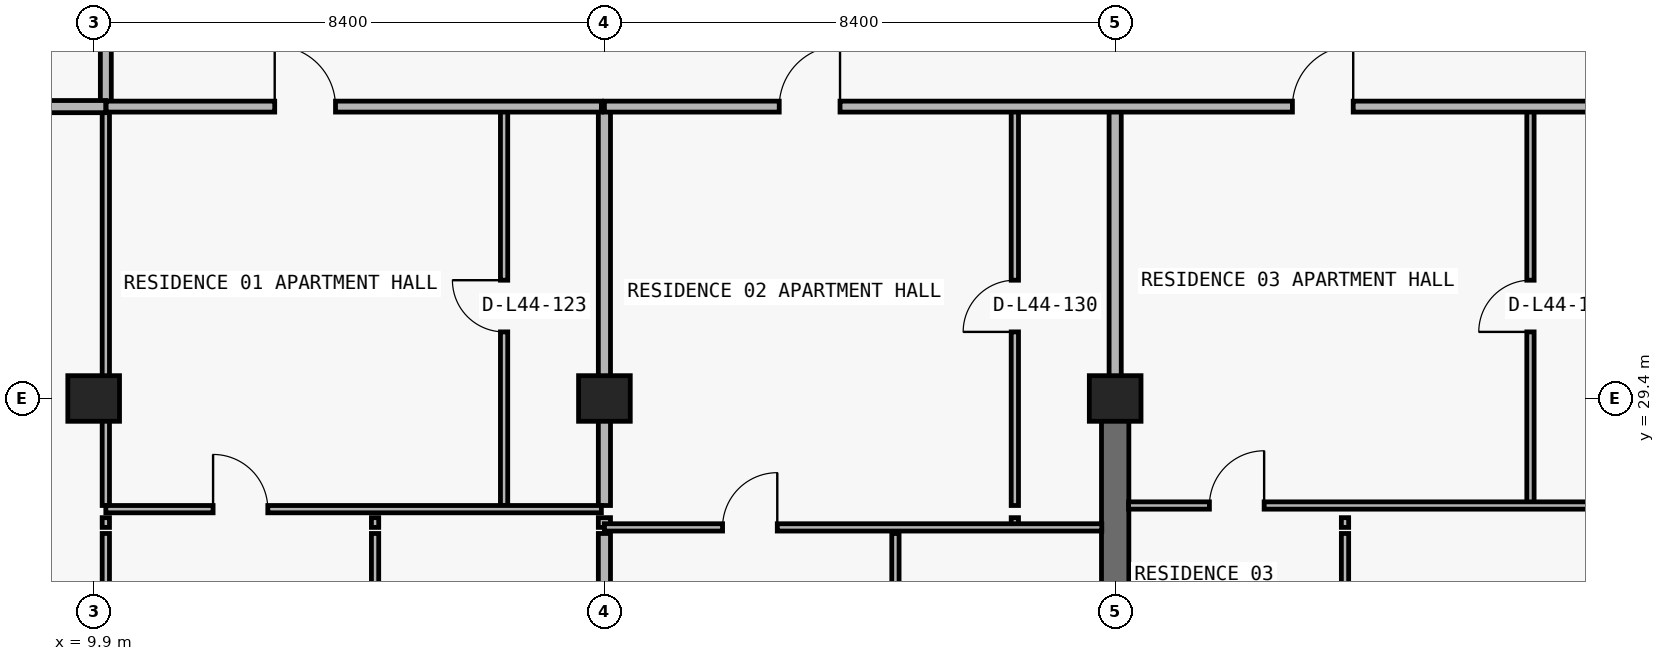
"""IFC4 building model, lengths in metres.
Left out: names, types, materials, properties, quantities, classifications, styles, units other than length and angle.
Written with IfcOpenShell. Run it as: python <this file> out.ifc"""

import sys

from ifc_helpers import new_model, si_unit, direction, frame, frame_2d, origin, origin_2d, place, context, subcontext, project, spatial, rectangle, extrude, element, fill, save


model = new_model("IFC4")
c1 = context("Model", 3, precision=1e-05, world=origin(), true_north=direction((0.0, 1.0)))
c2 = subcontext(c1, "Body", "Model", "MODEL_VIEW")
j1 = project(units=[si_unit("LENGTHUNIT", "METRE"), si_unit("PLANEANGLEUNIT", "RADIAN")], contexts=[c1])
p1 = place(None, origin())
s1 = spatial("IfcSite", under=j1, at=p1, CompositionType="ELEMENT")
p2 = place(p1, origin())
s2 = spatial("IfcBuilding", under=s1, at=p2, CompositionType="ELEMENT")
p3 = place(p2, frame((0.0, 0.0, 160.5)))
s3 = spatial("IfcBuildingStorey", under=s2, at=p3, CompositionType="ELEMENT", Elevation=160.5)
for number, where, z_axis, x_axis in (
    (1, (9.9, 29.4, 0.0), (0.0, 0.0, 1.0), (1.0, 0.0, 0.0)),
    (2, (18.3, 29.4, 0.0), (0.0, 0.0, 1.0), (1.0, 0.0, 0.0)),
    (3, (26.7, 29.4, 0.0), (0.0, 0.0, 1.0), (1.0, 0.0, 0.0)),
):
    element("IfcColumn", number, at=place(p3, frame(where, z_axis=z_axis, x_axis=x_axis)), inside=s3, PredefinedType="COLUMN", context=c2, shape_type="SweptSolid", body=[
        extrude(rectangle(XDim=0.85, YDim=0.75, at=origin_2d()), origin(), (0.0, 0.0, 1.0), 3.05),
    ])
p4 = place(p3, frame((26.7, 20.8, 0.0), z_axis=(0.0, 0.0, 1.0), x_axis=(0.0, 1.0, 0.0)))
e4 = element("IfcWall", 4, at=p4, inside=s3, PredefinedType="SHEAR", context=c2, shape_type="SweptSolid", body=[
    extrude(rectangle(XDim=8.6, YDim=0.45, at=frame_2d((4.3, 0.0))), origin(), (0.0, 0.0, 1.0), 3.05),
])
p5 = place(p3, frame((10.1, 22.43, 0.0), z_axis=(0.0, 0.0, 1.0), x_axis=(0.0, 1.0, 0.0)))
e5 = element("IfcWall", 5, at=p5, inside=s3, PredefinedType="PARTITIONING", context=c2, shape_type="SweptSolid", body=[
    extrude(rectangle(XDim=4.75, YDim=0.12, at=frame_2d((2.375, 0.0))), origin(), (0.0, 0.0, 1.0), 2.263),
])
p6 = place(p5, frame((1.925, 0.0, 0.0)))
e6 = element("IfcOpeningElement", 6, at=p6, cuts=e5, PredefinedType="OPENING", context=c2, shape_type="SweptSolid", body=[
    extrude(rectangle(XDim=0.9, YDim=2.15, at=frame_2d((0.45, 1.075))), frame((0.0, 0.07, 0.0), z_axis=(0.0, -1.0, 0.0), x_axis=(1.0, 0.0, 0.0)), (0.0, 0.0, 1.0), 0.14),
])
p7 = place(p3, frame((10.1, 27.28, 0.0), z_axis=(0.0, 0.0, 1.0), x_axis=(0.0, 1.0, 0.0)))
e7 = element("IfcWall", 7, at=p7, inside=s3, PredefinedType="PARTITIONING", context=c2, shape_type="SweptSolid", body=[
    extrude(rectangle(XDim=0.16, YDim=0.12, at=frame_2d((0.08, 0.0))), origin(), (0.0, 0.0, 1.0), 2.263),
])
p8 = place(p3, frame((10.1, 27.64, 0.0), z_axis=(0.0, 0.0, 1.0), x_axis=(0.0, 1.0, 0.0)))
e8 = element("IfcWall", 8, at=p8, inside=s3, PredefinedType="PARTITIONING", context=c2, shape_type="SweptSolid", body=[
    extrude(rectangle(XDim=6.56, YDim=0.12, at=frame_2d((3.28, 0.0))), origin(), (0.0, 0.0, 1.0), 2.263),
])
p9 = place(p3, frame((10.1, 34.205, 0.0), z_axis=(0.0, 0.0, 1.0), x_axis=(0.0, 1.0, 0.0)))
e9 = element("IfcWall", 9, at=p9, inside=s3, PredefinedType="PARTITIONING", context=c2, shape_type="SweptSolid", body=[
    extrude(rectangle(XDim=2.745, YDim=0.18, at=frame_2d((1.373, 0.0))), origin(), (0.0, 0.0, 1.0), 2.263),
])
p10 = place(p3, frame((14.528, 22.43, 0.0), z_axis=(0.0, 0.0, 1.0), x_axis=(0.0, 1.0, 0.0)))
e10 = element("IfcWall", 10, at=p10, inside=s3, PredefinedType="PARTITIONING", context=c2, shape_type="SweptSolid", body=[
    extrude(rectangle(XDim=4.75, YDim=0.12, at=frame_2d((2.375, 0.0))), origin(), (0.0, 0.0, 1.0), 3.05),
])
p11 = place(p10, frame((1.925, 0.0, 0.0)))
e11 = element("IfcOpeningElement", 11, at=p11, cuts=e10, PredefinedType="OPENING", context=c2, shape_type="SweptSolid", body=[
    extrude(rectangle(XDim=0.9, YDim=2.15, at=frame_2d((0.45, 1.075))), frame((0.0, 0.07, 0.0), z_axis=(0.0, -1.0, 0.0), x_axis=(1.0, 0.0, 0.0)), (0.0, 0.0, 1.0), 0.14),
])
p12 = place(p3, frame((14.528, 27.28, 0.0), z_axis=(0.0, 0.0, 1.0), x_axis=(0.0, 1.0, 0.0)))
e12 = element("IfcWall", 12, at=p12, inside=s3, PredefinedType="PARTITIONING", context=c2, shape_type="SweptSolid", body=[
    extrude(rectangle(XDim=0.16, YDim=0.12, at=frame_2d((0.08, 0.0))), origin(), (0.0, 0.0, 1.0), 3.05),
])
p13 = place(p3, frame((16.65, 27.64, 0.0), z_axis=(0.0, 0.0, 1.0), x_axis=(0.0, 1.0, 0.0)))
e13 = element("IfcWall", 13, at=p13, inside=s3, PredefinedType="PARTITIONING", context=c2, shape_type="SweptSolid", body=[
    extrude(rectangle(XDim=6.56, YDim=0.12, at=frame_2d((3.28, 0.0))), origin(), (0.0, 0.0, 1.0), 3.05),
])
p14 = place(p13, frame((2.855, 0.0, 0.0)))
e14 = element("IfcOpeningElement", 14, at=p14, cuts=e13, PredefinedType="OPENING", context=c2, shape_type="SweptSolid", body=[
    extrude(rectangle(XDim=0.85, YDim=2.1, at=frame_2d((0.425, 1.05))), frame((0.0, 0.07, 0.0), z_axis=(0.0, -1.0, 0.0), x_axis=(1.0, 0.0, 0.0)), (0.0, 0.0, 1.0), 0.14),
])
p15 = place(p3, frame((18.3, 22.43, 0.0), z_axis=(0.0, 0.0, 1.0), x_axis=(0.0, 1.0, 0.0)))
e15 = element("IfcWall", 15, at=p15, inside=s3, PredefinedType="PARTITIONING", context=c2, shape_type="SweptSolid", body=[
    extrude(rectangle(XDim=4.75, YDim=0.2, at=frame_2d((2.375, 0.0))), origin(), (0.0, 0.0, 1.0), 2.263),
])
p16 = place(p3, frame((18.3, 27.28, 0.0), z_axis=(0.0, 0.0, 1.0), x_axis=(0.0, 1.0, 0.0)))
e16 = element("IfcWall", 16, at=p16, inside=s3, PredefinedType="PARTITIONING", context=c2, shape_type="SweptSolid", body=[
    extrude(rectangle(XDim=0.16, YDim=0.2, at=frame_2d((0.08, 0.0))), origin(), (0.0, 0.0, 1.0), 2.263),
])
p17 = place(p3, frame((18.3, 27.64, 0.0), z_axis=(0.0, 0.0, 1.0), x_axis=(0.0, 1.0, 0.0)))
e17 = element("IfcWall", 17, at=p17, inside=s3, PredefinedType="PARTITIONING", context=c2, shape_type="SweptSolid", body=[
    extrude(rectangle(XDim=6.56, YDim=0.2, at=frame_2d((3.28, 0.0))), origin(), (0.0, 0.0, 1.0), 2.263),
])
p18 = place(p3, frame((23.086, 22.43, 0.0), z_axis=(0.0, 0.0, 1.0), x_axis=(0.0, 1.0, 0.0)))
e18 = element("IfcWall", 18, at=p18, inside=s3, PredefinedType="PARTITIONING", context=c2, shape_type="SweptSolid", body=[
    extrude(rectangle(XDim=4.75, YDim=0.12, at=frame_2d((2.375, 0.0))), origin(), (0.0, 0.0, 1.0), 3.05),
])
p19 = place(p18, frame((1.925, 0.0, 0.0)))
e19 = element("IfcOpeningElement", 19, at=p19, cuts=e18, PredefinedType="OPENING", context=c2, shape_type="SweptSolid", body=[
    extrude(rectangle(XDim=0.9, YDim=2.15, at=frame_2d((0.45, 1.075))), frame((0.0, 0.07, 0.0), z_axis=(0.0, -1.0, 0.0), x_axis=(1.0, 0.0, 0.0)), (0.0, 0.0, 1.0), 0.14),
])
p20 = place(p3, frame((25.05, 27.28, 0.0), z_axis=(0.0, 0.0, 1.0), x_axis=(0.0, 1.0, 0.0)))
e20 = element("IfcWall", 20, at=p20, inside=s3, PredefinedType="PARTITIONING", context=c2, shape_type="SweptSolid", body=[
    extrude(rectangle(XDim=0.16, YDim=0.12, at=frame_2d((0.08, 0.0))), origin(), (0.0, 0.0, 1.0), 3.05),
])
p21 = place(p3, frame((25.05, 27.64, 0.0), z_axis=(0.0, 0.0, 1.0), x_axis=(0.0, 1.0, 0.0)))
e21 = element("IfcWall", 21, at=p21, inside=s3, PredefinedType="PARTITIONING", context=c2, shape_type="SweptSolid", body=[
    extrude(rectangle(XDim=6.56, YDim=0.12, at=frame_2d((3.28, 0.0))), origin(), (0.0, 0.0, 1.0), 3.05),
])
p22 = place(p21, frame((2.855, 0.0, 0.0)))
e22 = element("IfcOpeningElement", 22, at=p22, cuts=e21, PredefinedType="OPENING", context=c2, shape_type="SweptSolid", body=[
    extrude(rectangle(XDim=0.85, YDim=2.1, at=frame_2d((0.425, 1.05))), frame((0.0, 0.07, 0.0), z_axis=(0.0, -1.0, 0.0), x_axis=(1.0, 0.0, 0.0)), (0.0, 0.0, 1.0), 0.14),
])
p23 = place(p3, frame((26.7, 29.405, 0.0), z_axis=(0.0, 0.0, 1.0), x_axis=(0.0, 1.0, 0.0)))
e23 = element("IfcWall", 23, at=p23, inside=s3, PredefinedType="PARTITIONING", context=c2, shape_type="SweptSolid", body=[
    extrude(rectangle(XDim=4.795, YDim=0.2, at=frame_2d((2.397, 0.0))), origin(), (0.0, 0.0, 1.0), 2.335),
])
p24 = place(p3, frame((30.48, 22.84, 0.0), z_axis=(0.0, 0.0, 1.0), x_axis=(0.0, 1.0, 0.0)))
e24 = element("IfcWall", 24, at=p24, inside=s3, PredefinedType="PARTITIONING", context=c2, shape_type="SweptSolid", body=[
    extrude(rectangle(XDim=4.34, YDim=0.12, at=frame_2d((2.17, 0.0))), origin(), (0.0, 0.0, 1.0), 3.05),
])
p25 = place(p24, frame((1.72, 0.0, 0.0)))
e25 = element("IfcOpeningElement", 25, at=p25, cuts=e24, PredefinedType="OPENING", context=c2, shape_type="SweptSolid", body=[
    extrude(rectangle(XDim=0.9, YDim=2.15, at=frame_2d((0.45, 1.075))), frame((0.0, 0.07, 0.0), z_axis=(0.0, -1.0, 0.0), x_axis=(1.0, 0.0, 0.0)), (0.0, 0.0, 1.0), 0.14),
])
p26 = place(p3, frame((30.48, 27.28, 0.0), z_axis=(0.0, 0.0, 1.0), x_axis=(0.0, 1.0, 0.0)))
e26 = element("IfcWall", 26, at=p26, inside=s3, PredefinedType="PARTITIONING", context=c2, shape_type="SweptSolid", body=[
    extrude(rectangle(XDim=0.16, YDim=0.12, at=frame_2d((0.08, 0.0))), origin(), (0.0, 0.0, 1.0), 3.05),
])
p27 = place(p3, frame((33.53, 27.64, 0.0), z_axis=(0.0, 0.0, 1.0), x_axis=(0.0, 1.0, 0.0)))
e27 = element("IfcWall", 27, at=p27, inside=s3, PredefinedType="PARTITIONING", context=c2, shape_type="SweptSolid", body=[
    extrude(rectangle(XDim=6.56, YDim=0.12, at=frame_2d((3.28, 0.0))), origin(), (0.0, 0.0, 1.0), 3.05),
])
p28 = place(p27, frame((2.855, 0.0, 0.0)))
e28 = element("IfcOpeningElement", 28, at=p28, cuts=e27, PredefinedType="OPENING", context=c2, shape_type="SweptSolid", body=[
    extrude(rectangle(XDim=0.85, YDim=2.1, at=frame_2d((0.425, 1.05))), frame((0.0, 0.07, 0.0), z_axis=(0.0, -1.0, 0.0), x_axis=(1.0, 0.0, 0.0)), (0.0, 0.0, 1.0), 0.14),
])
p29 = place(p3, frame((18.3, 27.28, 0.0), z_axis=(0.0, 0.0, 1.0), x_axis=(1.0, 0.0, 0.0)))
e29 = element("IfcWall", 29, at=p29, inside=s3, PredefinedType="PARTITIONING", context=c2, shape_type="SweptSolid", body=[
    extrude(rectangle(XDim=8.18, YDim=0.12, at=frame_2d((4.09, 0.0))), origin(), (0.0, 0.0, 1.0), 3.05),
])
p30 = place(p29, frame((1.943, 0.0, 0.0)))
e30 = element("IfcOpeningElement", 30, at=p30, cuts=e29, PredefinedType="OPENING", context=c2, shape_type="SweptSolid", body=[
    extrude(rectangle(XDim=0.9, YDim=2.15, at=frame_2d((0.45, 1.075))), frame((0.0, 0.07, 0.0), z_axis=(0.0, -1.0, 0.0), x_axis=(1.0, 0.0, 0.0)), (0.0, 0.0, 1.0), 0.14),
])
p31 = place(p3, frame((10.1, 27.58, 0.0), z_axis=(0.0, 0.0, 1.0), x_axis=(1.0, 0.0, 0.0)))
e31 = element("IfcWall", 31, at=p31, inside=s3, PredefinedType="PARTITIONING", context=c2, shape_type="SweptSolid", body=[
    extrude(rectangle(XDim=8.15, YDim=0.12, at=frame_2d((4.075, 0.0))), origin(), (0.0, 0.0, 1.0), 3.05),
])
p32 = place(p31, frame((1.764, 0.0, 0.0)))
e32 = element("IfcOpeningElement", 32, at=p32, cuts=e31, PredefinedType="OPENING", context=c2, shape_type="SweptSolid", body=[
    extrude(rectangle(XDim=0.9, YDim=2.15, at=frame_2d((0.45, 1.075))), frame((0.0, 0.07, 0.0), z_axis=(0.0, -1.0, 0.0), x_axis=(1.0, 0.0, 0.0)), (0.0, 0.0, 1.0), 0.14),
])
p33 = place(p3, frame((26.92, 27.64, 0.0), z_axis=(0.0, 0.0, 1.0), x_axis=(1.0, 0.0, 0.0)))
e33 = element("IfcWall", 33, at=p33, inside=s3, PredefinedType="PARTITIONING", context=c2, shape_type="SweptSolid", body=[
    extrude(rectangle(XDim=8.175, YDim=0.12, at=frame_2d((4.087, 0.0))), origin(), (0.0, 0.0, 1.0), 3.05),
])
p34 = place(p33, frame((1.33, 0.0, 0.0)))
e34 = element("IfcOpeningElement", 34, at=p34, cuts=e33, PredefinedType="OPENING", context=c2, shape_type="SweptSolid", body=[
    extrude(rectangle(XDim=0.9, YDim=2.15, at=frame_2d((0.45, 1.075))), frame((0.0, 0.07, 0.0), z_axis=(0.0, -1.0, 0.0), x_axis=(1.0, 0.0, 0.0)), (0.0, 0.0, 1.0), 0.14),
])
p35 = place(p3, frame((6.395, 34.2, 0.0), z_axis=(0.0, 0.0, 1.0), x_axis=(1.0, 0.0, 0.0)))
e35 = element("IfcWall", 35, at=p35, inside=s3, PredefinedType="PARTITIONING", context=c2, shape_type="SweptSolid", body=[
    extrude(rectangle(XDim=3.705, YDim=0.2, at=frame_2d((1.853, 0.0))), origin(), (0.0, 0.0, 1.0), 3.05),
])
p36 = place(p3, frame((10.105, 34.2, 0.0), z_axis=(0.0, 0.0, 1.0), x_axis=(1.0, 0.0, 0.0)))
e36 = element("IfcWall", 36, at=p36, inside=s3, PredefinedType="PARTITIONING", context=c2, shape_type="SweptSolid", body=[
    extrude(rectangle(XDim=8.145, YDim=0.18, at=frame_2d((4.073, 0.0))), origin(), (0.0, 0.0, 1.0), 3.05),
])
p37 = place(p36, frame((2.772, 0.0, 0.0)))
e37 = element("IfcOpeningElement", 37, at=p37, cuts=e36, PredefinedType="OPENING", context=c2, shape_type="SweptSolid", body=[
    extrude(rectangle(XDim=1.0, YDim=2.2, at=frame_2d((0.5, 1.1))), frame((0.0, 0.1, 0.0), z_axis=(0.0, -1.0, 0.0), x_axis=(1.0, 0.0, 0.0)), (0.0, 0.0, 1.0), 0.2),
])
p38 = place(p3, frame((18.3, 34.2, 0.0), z_axis=(0.0, 0.0, 1.0), x_axis=(1.0, 0.0, 0.0)))
e38 = element("IfcWall", 38, at=p38, inside=s3, PredefinedType="PARTITIONING", context=c2, shape_type="SweptSolid", body=[
    extrude(rectangle(XDim=37.586, YDim=0.18, at=frame_2d((18.793, 0.0))), origin(), (0.0, 0.0, 1.0), 3.05),
])
p39 = place(p38, frame((2.875, 0.0, 0.0)))
e39 = element("IfcOpeningElement", 39, at=p39, cuts=e38, PredefinedType="OPENING", context=c2, shape_type="SweptSolid", body=[
    extrude(rectangle(XDim=1.0, YDim=2.2, at=frame_2d((0.5, 1.1))), frame((0.0, 0.1, 0.0), z_axis=(0.0, -1.0, 0.0), x_axis=(1.0, 0.0, 0.0)), (0.0, 0.0, 1.0), 0.2),
])
p40 = place(p38, frame((11.315, 0.0, 0.0)))
e40 = element("IfcOpeningElement", 40, at=p40, cuts=e38, PredefinedType="OPENING", context=c2, shape_type="SweptSolid", body=[
    extrude(rectangle(XDim=1.0, YDim=2.2, at=frame_2d((0.5, 1.1))), frame((0.0, 0.1, 0.0), z_axis=(0.0, -1.0, 0.0), x_axis=(1.0, 0.0, 0.0)), (0.0, 0.0, 1.0), 0.2),
])
p41 = place(p38, frame((27.275, 0.0, 0.0)))
e41 = element("IfcOpeningElement", 41, at=p41, cuts=e38, PredefinedType="OPENING", context=c2, shape_type="SweptSolid", body=[
    extrude(rectangle(XDim=1.0, YDim=2.2, at=frame_2d((0.5, 1.1))), frame((0.0, 0.1, 0.0), z_axis=(0.0, -1.0, 0.0), x_axis=(1.0, 0.0, 0.0)), (0.0, 0.0, 1.0), 0.2),
])
p42 = place(p38, frame((34.693, 0.0, 0.0)))
e42 = element("IfcOpeningElement", 42, at=p42, cuts=e38, PredefinedType="OPENING", context=c2, shape_type="SweptSolid", body=[
    extrude(rectangle(XDim=1.0, YDim=2.2, at=frame_2d((0.5, 1.1))), frame((0.0, 0.1, 0.0), z_axis=(0.0, -1.0, 0.0), x_axis=(1.0, 0.0, 0.0)), (0.0, 0.0, 1.0), 0.2),
])
p43 = place(p37, origin())
e43 = element("IfcDoor", 43, at=p43, inside=s3, OperationType="SINGLE_SWING_LEFT", PredefinedType="DOOR", context=c2, shape_type="SweptSolid", body=[
    extrude(rectangle(XDim=1.0, YDim=2.2, at=frame_2d((0.5, 1.1))), frame((0.0, 0.025, 0.0), z_axis=(0.0, -1.0, 0.0), x_axis=(1.0, 0.0, 0.0)), (0.0, 0.0, 1.0), 0.05),
])
fill(e37, e43)
p44 = place(p14, origin())
e44 = element("IfcDoor", 44, at=p44, inside=s3, OperationType="SINGLE_SWING_RIGHT", PredefinedType="DOOR", context=c2, shape_type="SweptSolid", body=[
    extrude(rectangle(XDim=0.85, YDim=2.1, at=frame_2d((0.425, 1.05))), frame((0.0, 0.025, 0.0), z_axis=(0.0, -1.0, 0.0), x_axis=(1.0, 0.0, 0.0)), (0.0, 0.0, 1.0), 0.05),
])
fill(e14, e44)
p45 = place(p32, origin())
e45 = element("IfcDoor", 45, at=p45, inside=s3, OperationType="SINGLE_SWING_LEFT", PredefinedType="DOOR", context=c2, shape_type="SweptSolid", body=[
    extrude(rectangle(XDim=0.9, YDim=2.15, at=frame_2d((0.45, 1.075))), frame((0.0, 0.025, 0.0), z_axis=(0.0, -1.0, 0.0), x_axis=(1.0, 0.0, 0.0)), (0.0, 0.0, 1.0), 0.05),
])
fill(e32, e45)
p46 = place(p39, origin())
e46 = element("IfcDoor", 46, at=p46, inside=s3, OperationType="SINGLE_SWING_RIGHT", PredefinedType="DOOR", context=c2, shape_type="SweptSolid", body=[
    extrude(rectangle(XDim=1.0, YDim=2.2, at=frame_2d((0.5, 1.1))), frame((0.0, 0.025, 0.0), z_axis=(0.0, -1.0, 0.0), x_axis=(1.0, 0.0, 0.0)), (0.0, 0.0, 1.0), 0.05),
])
fill(e39, e46)
p47 = place(p22, origin())
e47 = element("IfcDoor", 47, at=p47, inside=s3, OperationType="SINGLE_SWING_LEFT", PredefinedType="DOOR", context=c2, shape_type="SweptSolid", body=[
    extrude(rectangle(XDim=0.85, YDim=2.1, at=frame_2d((0.425, 1.05))), frame((0.0, 0.025, 0.0), z_axis=(0.0, -1.0, 0.0), x_axis=(1.0, 0.0, 0.0)), (0.0, 0.0, 1.0), 0.05),
])
fill(e22, e47)
p48 = place(p30, origin())
e48 = element("IfcDoor", 48, at=p48, inside=s3, OperationType="SINGLE_SWING_RIGHT", PredefinedType="DOOR", context=c2, shape_type="SweptSolid", body=[
    extrude(rectangle(XDim=0.9, YDim=2.15, at=frame_2d((0.45, 1.075))), frame((0.0, 0.025, 0.0), z_axis=(0.0, -1.0, 0.0), x_axis=(1.0, 0.0, 0.0)), (0.0, 0.0, 1.0), 0.05),
])
fill(e30, e48)
p49 = place(p40, origin())
e49 = element("IfcDoor", 49, at=p49, inside=s3, OperationType="SINGLE_SWING_RIGHT", PredefinedType="DOOR", context=c2, shape_type="SweptSolid", body=[
    extrude(rectangle(XDim=1.0, YDim=2.2, at=frame_2d((0.5, 1.1))), frame((0.0, 0.025, 0.0), z_axis=(0.0, -1.0, 0.0), x_axis=(1.0, 0.0, 0.0)), (0.0, 0.0, 1.0), 0.05),
])
fill(e40, e49)
p50 = place(p28, origin())
e50 = element("IfcDoor", 50, at=p50, inside=s3, OperationType="SINGLE_SWING_LEFT", PredefinedType="DOOR", context=c2, shape_type="SweptSolid", body=[
    extrude(rectangle(XDim=0.85, YDim=2.1, at=frame_2d((0.425, 1.05))), frame((0.0, 0.025, 0.0), z_axis=(0.0, -1.0, 0.0), x_axis=(1.0, 0.0, 0.0)), (0.0, 0.0, 1.0), 0.05),
])
fill(e28, e50)
p51 = place(p34, origin())
e51 = element("IfcDoor", 51, at=p51, inside=s3, OperationType="SINGLE_SWING_RIGHT", PredefinedType="DOOR", context=c2, shape_type="SweptSolid", body=[
    extrude(rectangle(XDim=0.9, YDim=2.15, at=frame_2d((0.45, 1.075))), frame((0.0, 0.025, 0.0), z_axis=(0.0, -1.0, 0.0), x_axis=(1.0, 0.0, 0.0)), (0.0, 0.0, 1.0), 0.05),
])
fill(e34, e51)
save(model, sys.argv[1])
